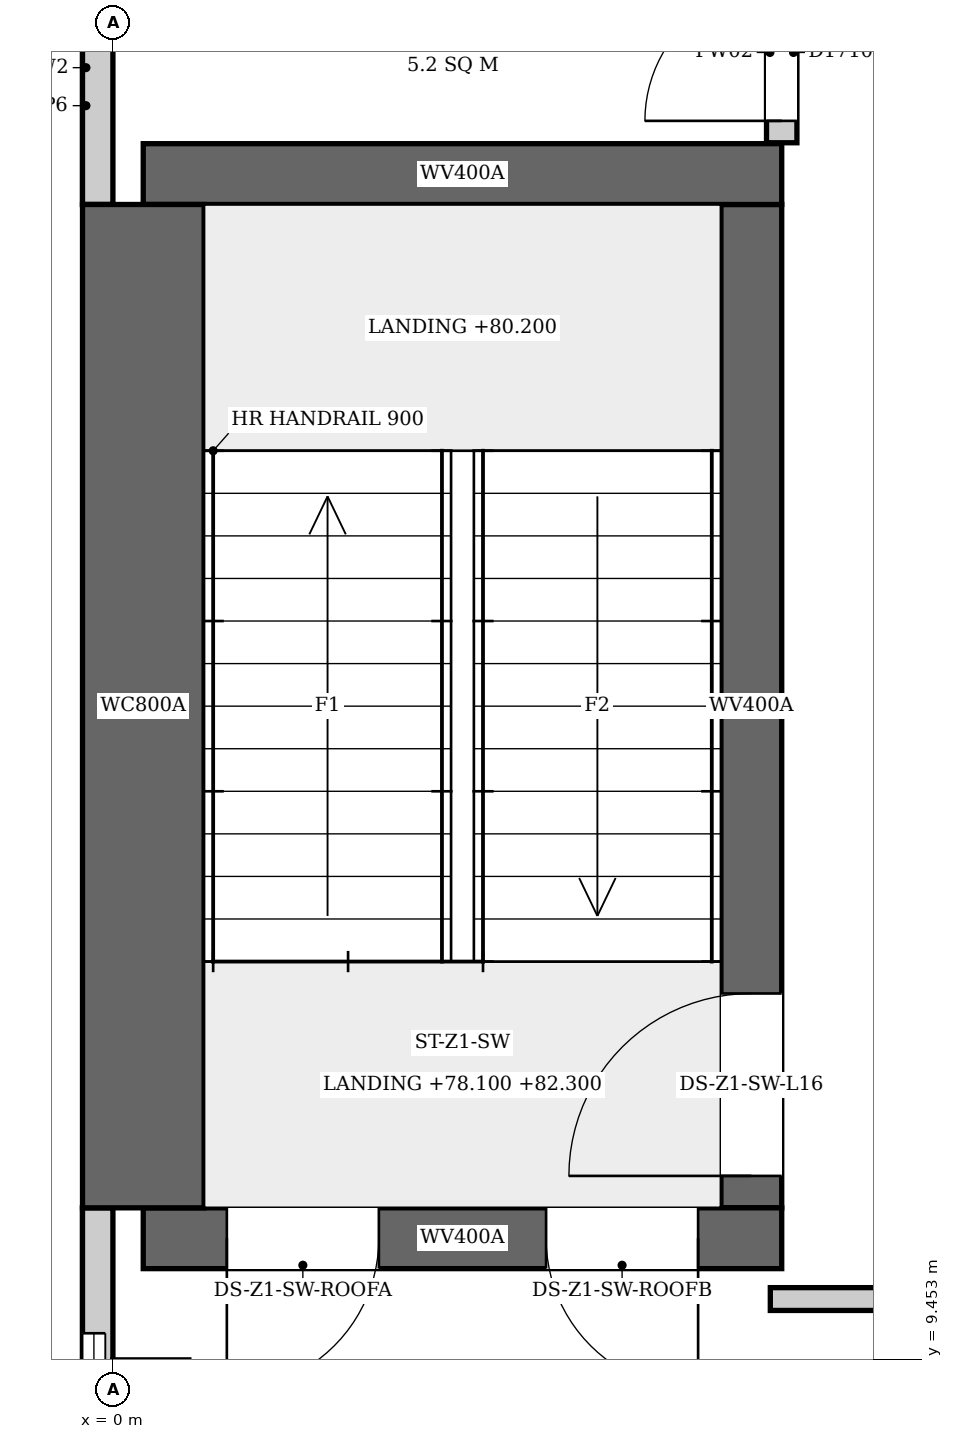
"""IFC4 building model, lengths in metres.
Left out: names, types, materials, properties, quantities, classifications, styles, units other than length and angle.
Written with IfcOpenShell. Run it as: python <this file> out.ifc"""

import sys

from ifc_helpers import new_model, si_unit, direction, frame, frame_2d, origin, place, context, subcontext, project, spatial, rectangle, extrude, element, fill, save


model = new_model("IFC4")
c1 = context("Model", 3, precision=1e-05, world=origin(), true_north=direction((0.0, 1.0)))
c2 = subcontext(c1, "Body", "Model", "MODEL_VIEW")
j1 = project(units=[si_unit("LENGTHUNIT", "METRE"), si_unit("PLANEANGLEUNIT", "RADIAN")], contexts=[c1])
p1 = place(None, origin())
s1 = spatial("IfcSite", under=j1, at=p1, CompositionType="ELEMENT")
p2 = place(p1, origin())
s2 = spatial("IfcBuilding", under=s1, at=p2, CompositionType="ELEMENT")
p3 = place(p2, frame((0.0, 0.0, 78.1)))
s3 = spatial("IfcBuildingStorey", under=s2, at=p3, CompositionType="ELEMENT", Elevation=78.1)
p4 = place(p3, frame((0.2, 10.25, 0.0), z_axis=(0.0, 0.0, 1.0), x_axis=(1.0, 0.0, 0.0)))
e1 = element("IfcWall", 1, at=p4, inside=s3, PredefinedType="SHEAR", context=c2, shape_type="SweptSolid", body=[
    extrude(rectangle(XDim=4.2, YDim=0.4, at=frame_2d((2.1, 0.0))), origin(), (0.0, 0.0, 1.0), 7.1),
])
p5 = place(p4, frame((0.55, 0.0, 4.2)))
e2 = element("IfcOpeningElement", 2, at=p5, cuts=e1, PredefinedType="OPENING", context=c2, shape_type="SweptSolid", body=[
    extrude(rectangle(XDim=1.0, YDim=2.1, at=frame_2d((0.5, 1.05))), frame((0.0, 0.21, 0.0), z_axis=(0.0, -1.0, 0.0), x_axis=(1.0, 0.0, 0.0)), (0.0, 0.0, 1.0), 0.42),
])
p6 = place(p4, frame((2.65, 0.0, 4.2)))
e3 = element("IfcOpeningElement", 3, at=p6, cuts=e1, PredefinedType="OPENING", context=c2, shape_type="SweptSolid", body=[
    extrude(rectangle(XDim=1.0, YDim=2.1, at=frame_2d((0.5, 1.05))), frame((0.0, 0.21, 0.0), z_axis=(0.0, -1.0, 0.0), x_axis=(1.0, 0.0, 0.0)), (0.0, 0.0, 1.0), 0.42),
])
p7 = place(p3, frame((0.2, 17.25, 0.0), z_axis=(0.0, 0.0, 1.0), x_axis=(1.0, 0.0, 0.0)))
e4 = element("IfcWall", 4, at=p7, inside=s3, PredefinedType="SHEAR", context=c2, shape_type="SweptSolid", body=[
    extrude(rectangle(XDim=4.2, YDim=0.4, at=frame_2d((2.1, 0.0))), origin(), (0.0, 0.0, 1.0), 7.1),
])
p8 = place(p3, frame((0.2, 10.45, 0.0), z_axis=(0.0, 0.0, 1.0), x_axis=(0.0, 1.0, 0.0)))
e5 = element("IfcWall", 5, at=p8, inside=s3, PredefinedType="SHEAR", context=c2, shape_type="SweptSolid", body=[
    extrude(rectangle(XDim=6.6, YDim=0.8, at=frame_2d((3.3, 0.0))), origin(), (0.0, 0.0, 1.0), 7.1),
])
p9 = place(p3, frame((4.2, 10.45, 0.0), z_axis=(0.0, 0.0, 1.0), x_axis=(0.0, 1.0, 0.0)))
e6 = element("IfcWall", 6, at=p9, inside=s3, PredefinedType="SHEAR", context=c2, shape_type="SweptSolid", body=[
    extrude(rectangle(XDim=6.6, YDim=0.4, at=frame_2d((3.3, 0.0))), origin(), (0.0, 0.0, 1.0), 7.1),
])
p10 = place(p9, frame((0.21, 0.0, 0.0)))
e7 = element("IfcOpeningElement", 7, at=p10, cuts=e6, PredefinedType="OPENING", context=c2, shape_type="SweptSolid", body=[
    extrude(rectangle(XDim=1.2, YDim=2.1, at=frame_2d((0.6, 1.05))), frame((0.0, 0.21, 0.0), z_axis=(0.0, -1.0, 0.0), x_axis=(1.0, 0.0, 0.0)), (0.0, 0.0, 1.0), 0.42),
])
p11 = place(p3, frame((-0.125, 10.45, 0.0), z_axis=(0.0, 0.0, 1.0), x_axis=(0.0, -1.0, 0.0)))
e8 = element("IfcWall", 8, at=p11, inside=s3, PredefinedType="ELEMENTEDWALL", context=c2, shape_type="SweptSolid", body=[
    extrude(rectangle(XDim=10.65, YDim=0.15, at=frame_2d((5.325, 0.0))), origin(), (0.0, 0.0, 1.0), 3.9),
])
p12 = place(p11, frame((8.025, 0.0, 0.9)))
e9 = element("IfcOpeningElement", 9, at=p12, cuts=e8, PredefinedType="OPENING", context=c2, shape_type="SweptSolid", body=[
    extrude(rectangle(XDim=1.8, YDim=2.6, at=frame_2d((0.9, 1.3))), frame((0.0, 0.085, 0.0), z_axis=(0.0, -1.0, 0.0), x_axis=(1.0, 0.0, 0.0)), (0.0, 0.0, 1.0), 0.17),
])
p13 = place(p11, frame((5.625, 0.0, 0.9)))
e10 = element("IfcOpeningElement", 10, at=p13, cuts=e8, PredefinedType="OPENING", context=c2, shape_type="SweptSolid", body=[
    extrude(rectangle(XDim=1.8, YDim=2.6, at=frame_2d((0.9, 1.3))), frame((0.0, 0.085, 0.0), z_axis=(0.0, -1.0, 0.0), x_axis=(1.0, 0.0, 0.0)), (0.0, 0.0, 1.0), 0.17),
])
p14 = place(p11, frame((3.225, 0.0, 0.9)))
e11 = element("IfcOpeningElement", 11, at=p14, cuts=e8, PredefinedType="OPENING", context=c2, shape_type="SweptSolid", body=[
    extrude(rectangle(XDim=1.8, YDim=2.6, at=frame_2d((0.9, 1.3))), frame((0.0, 0.085, 0.0), z_axis=(0.0, -1.0, 0.0), x_axis=(1.0, 0.0, 0.0)), (0.0, 0.0, 1.0), 0.17),
])
p15 = place(p11, frame((0.825, 0.0, 0.9)))
e12 = element("IfcOpeningElement", 12, at=p15, cuts=e8, PredefinedType="OPENING", context=c2, shape_type="SweptSolid", body=[
    extrude(rectangle(XDim=1.8, YDim=2.6, at=frame_2d((0.9, 1.3))), frame((0.0, 0.085, 0.0), z_axis=(0.0, -1.0, 0.0), x_axis=(1.0, 0.0, 0.0)), (0.0, 0.0, 1.0), 0.17),
])
p16 = place(p3, frame((-0.125, 18.85, 0.0), z_axis=(0.0, 0.0, 1.0), x_axis=(0.0, -1.0, 0.0)))
e13 = element("IfcWall", 13, at=p16, inside=s3, PredefinedType="ELEMENTEDWALL", context=c2, shape_type="SweptSolid", body=[
    extrude(rectangle(XDim=1.8, YDim=0.15, at=frame_2d((0.9, 0.0))), origin(), (0.0, 0.0, 1.0), 3.9),
])
p17 = place(p3, frame((-0.099, 10.45, 4.2), z_axis=(0.0, 0.0, 1.0), x_axis=(0.0, -1.0, 0.0)))
e14 = element("IfcWall", 14, at=p17, inside=s3, PredefinedType="PARAPET", context=c2, shape_type="SweptSolid", body=[
    extrude(rectangle(XDim=10.45, YDim=0.2, at=frame_2d((5.225, 0.0))), origin(), (0.0, 0.0, 1.0), 1.1),
])
p18 = place(p3, frame((-0.099, 18.65, 4.2), z_axis=(0.0, 0.0, 1.0), x_axis=(0.0, -1.0, 0.0)))
e15 = element("IfcWall", 15, at=p18, inside=s3, PredefinedType="PARAPET", context=c2, shape_type="SweptSolid", body=[
    extrude(rectangle(XDim=1.6, YDim=0.2, at=frame_2d((0.8, 0.0))), origin(), (0.0, 0.0, 1.0), 1.1),
])
p19 = place(p3, frame((4.4, 17.456, 0.0), z_axis=(0.0, 0.0, 1.0), x_axis=(0.0, 1.0, 0.0)))
e16 = element("IfcWall", 16, at=p19, inside=s3, PredefinedType="PARTITIONING", context=c2, shape_type="SweptSolid", body=[
    extrude(rectangle(XDim=1.188, YDim=0.2, at=frame_2d((0.594, 0.0))), origin(), (0.0, 0.0, 1.0), 3.9),
])
p20 = place(p19, frame((0.144, 0.0, 0.0)))
e17 = element("IfcOpeningElement", 17, at=p20, cuts=e16, PredefinedType="OPENING", context=c2, shape_type="SweptSolid", body=[
    extrude(rectangle(XDim=0.9, YDim=2.1, at=frame_2d((0.45, 1.05))), frame((0.0, 0.11, 0.0), z_axis=(0.0, -1.0, 0.0), x_axis=(1.0, 0.0, 0.0)), (0.0, 0.0, 1.0), 0.22),
])
p21 = place(p3, frame((4.325, 9.85, 0.0), z_axis=(0.0, 0.0, 1.0), x_axis=(1.0, 0.0, 0.0)))
e18 = element("IfcWall", 18, at=p21, inside=s3, PredefinedType="PARTITIONING", context=c2, shape_type="SweptSolid", body=[
    extrude(rectangle(XDim=24.219, YDim=0.15, at=frame_2d((12.109, 0.0))), origin(), (0.0, 0.0, 1.0), 3.9),
])
p22 = place(p21, frame((2.175, 0.0, 0.0)))
e19 = element("IfcOpeningElement", 19, at=p22, cuts=e18, PredefinedType="OPENING", context=c2, shape_type="SweptSolid", body=[
    extrude(rectangle(XDim=1.0, YDim=2.1, at=frame_2d((0.5, 1.05))), frame((0.0, 0.085, 0.0), z_axis=(0.0, -1.0, 0.0), x_axis=(1.0, 0.0, 0.0)), (0.0, 0.0, 1.0), 0.17),
])
p23 = place(p21, frame((9.575, 0.0, 0.0)))
e20 = element("IfcOpeningElement", 20, at=p23, cuts=e18, PredefinedType="OPENING", context=c2, shape_type="SweptSolid", body=[
    extrude(rectangle(XDim=1.0, YDim=2.1, at=frame_2d((0.5, 1.05))), frame((0.0, 0.085, 0.0), z_axis=(0.0, -1.0, 0.0), x_axis=(1.0, 0.0, 0.0)), (0.0, 0.0, 1.0), 0.17),
])
p24 = place(p21, frame((19.075, 0.0, 0.0)))
e21 = element("IfcOpeningElement", 21, at=p24, cuts=e18, PredefinedType="OPENING", context=c2, shape_type="SweptSolid", body=[
    extrude(rectangle(XDim=1.0, YDim=2.1, at=frame_2d((0.5, 1.05))), frame((0.0, 0.085, 0.0), z_axis=(0.0, -1.0, 0.0), x_axis=(1.0, 0.0, 0.0)), (0.0, 0.0, 1.0), 0.17),
])
p25 = place(p15, origin())
e22 = element("IfcWindow", 22, at=p25, inside=s3, PartitioningType="SINGLE_PANEL", PredefinedType="WINDOW", context=c2, shape_type="SweptSolid", body=[
    extrude(rectangle(XDim=1.8, YDim=2.6, at=frame_2d((0.9, 1.3))), frame((0.0, 0.03, 0.0), z_axis=(0.0, -1.0, 0.0), x_axis=(1.0, 0.0, 0.0)), (0.0, 0.0, 1.0), 0.06),
])
fill(e12, e22)
p26 = place(p10, origin())
e23 = element("IfcDoor", 23, at=p26, inside=s3, OperationType="SINGLE_SWING_RIGHT", PredefinedType="DOOR", context=c2, shape_type="SweptSolid", body=[
    extrude(rectangle(XDim=1.2, YDim=2.1, at=frame_2d((0.6, 1.05))), frame((0.0, 0.025, 0.0), z_axis=(0.0, -1.0, 0.0), x_axis=(1.0, 0.0, 0.0)), (0.0, 0.0, 1.0), 0.05),
])
fill(e7, e23)
p27 = place(p5, frame((1.0, 0.0, 0.0), z_axis=(0.0, 0.0, 1.0), x_axis=(-1.0, 0.0, 0.0)))
e24 = element("IfcDoor", 24, at=p27, inside=s3, OperationType="SINGLE_SWING_LEFT", PredefinedType="DOOR", context=c2, shape_type="SweptSolid", body=[
    extrude(rectangle(XDim=1.0, YDim=2.1, at=frame_2d((0.5, 1.05))), frame((0.0, 0.025, 0.0), z_axis=(0.0, -1.0, 0.0), x_axis=(1.0, 0.0, 0.0)), (0.0, 0.0, 1.0), 0.05),
])
fill(e2, e24)
p28 = place(p6, frame((1.0, 0.0, 0.0), z_axis=(0.0, 0.0, 1.0), x_axis=(-1.0, 0.0, 0.0)))
e25 = element("IfcDoor", 25, at=p28, inside=s3, OperationType="SINGLE_SWING_RIGHT", PredefinedType="DOOR", context=c2, shape_type="SweptSolid", body=[
    extrude(rectangle(XDim=1.0, YDim=2.1, at=frame_2d((0.5, 1.05))), frame((0.0, 0.025, 0.0), z_axis=(0.0, -1.0, 0.0), x_axis=(1.0, 0.0, 0.0)), (0.0, 0.0, 1.0), 0.05),
])
fill(e3, e25)
p29 = place(p20, origin())
e26 = element("IfcDoor", 26, at=p29, inside=s3, OperationType="SINGLE_SWING_LEFT", PredefinedType="DOOR", context=c2, shape_type="SweptSolid", body=[
    extrude(rectangle(XDim=0.9, YDim=2.1, at=frame_2d((0.45, 1.05))), frame((0.0, 0.025, 0.0), z_axis=(0.0, -1.0, 0.0), x_axis=(1.0, 0.0, 0.0)), (0.0, 0.0, 1.0), 0.05),
])
fill(e17, e26)
save(model, sys.argv[1])
